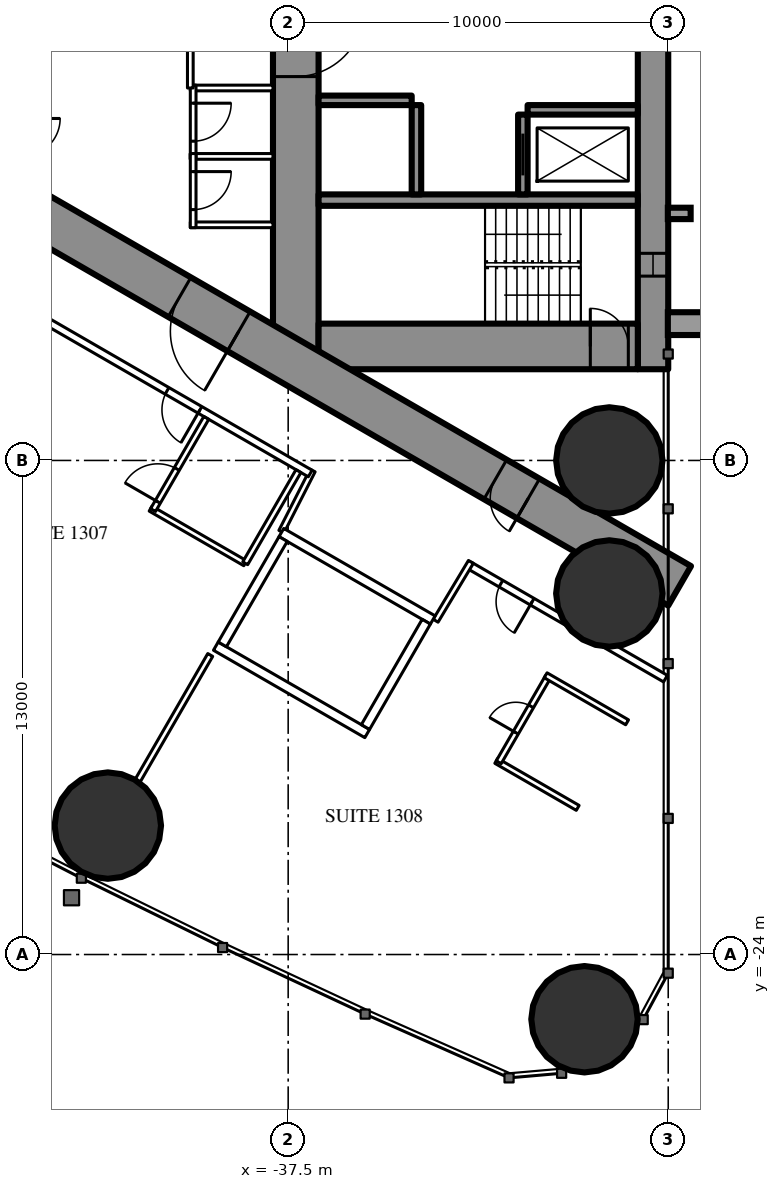
"""IFC4 building model, lengths in metres.
Left out: names, types, materials, properties, quantities, classifications, styles, units other than length and angle.
Written with IfcOpenShell. Run it as: python <this file> out.ifc"""

import sys

from ifc_helpers import new_model, si_unit, direction, frame, frame_2d, origin, origin_2d, place, context, subcontext, project, spatial, rectangle, hollow_circle, extrude, element, fill, save


model = new_model("IFC4")
c1 = context("Model", 3, precision=1e-05, world=origin(), true_north=direction((0.0, 1.0)))
c2 = subcontext(c1, "Body", "Model", "MODEL_VIEW")
j1 = project(units=[si_unit("LENGTHUNIT", "METRE"), si_unit("PLANEANGLEUNIT", "RADIAN")], contexts=[c1])
p1 = place(None, origin())
s1 = spatial("IfcSite", under=j1, at=p1, CompositionType="ELEMENT")
p2 = place(p1, origin())
s2 = spatial("IfcBuilding", under=s1, at=p2, CompositionType="ELEMENT")
p3 = place(p2, frame((0.0, 0.0, 53.0)))
s3 = spatial("IfcBuildingStorey", under=s2, at=p3, CompositionType="ELEMENT", Elevation=53.0)
for number, where, z_axis, x_axis in (
    (1, (-29.703, -25.703, 0.0), (0.0, 0.0, 1.0), (1.0, 0.0, 0.0)),
    (2, (-29.05, -11.0, 0.0), (0.0, 0.0, 1.0), (1.0, 0.0, 0.0)),
    (3, (-29.05, -14.5, 0.0), (0.0, 0.0, 1.0), (1.0, 0.0, 0.0)),
    (4, (-42.245, -20.607, 0.0), (0.0, 0.0, 1.0), (1.0, 0.0, 0.0)),
):
    element("IfcColumn", number, at=place(p3, frame(where, z_axis=z_axis, x_axis=x_axis)), inside=s3, PredefinedType="COLUMN", context=c2, shape_type="SweptSolid", body=[
        extrude(hollow_circle(Radius=1.4, WallThickness=0.12, at=origin_2d()), origin(), (0.0, 0.0, 1.0), 3.5),
    ])
p4 = place(p3, frame((-27.9, 8.6, 0.0), z_axis=(0.0, 0.0, 1.0), x_axis=(0.0, -1.0, 0.0)))
e5 = element("IfcWall", 5, at=p4, inside=s3, PredefinedType="SHEAR", context=c2, shape_type="SweptSolid", body=[
    extrude(rectangle(XDim=17.2, YDim=0.8, at=frame_2d((8.6, 0.0))), origin(), (0.0, 0.0, 1.0), 3.5),
])
p5 = place(p4, frame((2.45, 0.0, 0.6)))
e6 = element("IfcOpeningElement", 6, at=p5, cuts=e5, PredefinedType="OPENING", context=c2, shape_type="SweptSolid", body=[
    extrude(rectangle(XDim=0.6, YDim=2.1, at=frame_2d((0.3, 1.05))), frame((0.0, 0.41, 0.0), z_axis=(0.0, -1.0, 0.0), x_axis=(1.0, 0.0, 0.0)), (0.0, 0.0, 1.0), 0.82),
])
p6 = place(p4, frame((14.15, 0.0, 0.6)))
e7 = element("IfcOpeningElement", 7, at=p6, cuts=e5, PredefinedType="OPENING", context=c2, shape_type="SweptSolid", body=[
    extrude(rectangle(XDim=0.6, YDim=2.1, at=frame_2d((0.3, 1.05))), frame((0.0, 0.41, 0.0), z_axis=(0.0, -1.0, 0.0), x_axis=(1.0, 0.0, 0.0)), (0.0, 0.0, 1.0), 0.82),
])
p7 = place(p3, frame((-37.3, 8.6, 0.0), z_axis=(0.0, 0.0, 1.0), x_axis=(0.0, -1.0, 0.0)))
e8 = element("IfcWall", 8, at=p7, inside=s3, PredefinedType="SHEAR", context=c2, shape_type="SweptSolid", body=[
    extrude(rectangle(XDim=17.2, YDim=1.2, at=frame_2d((8.6, 0.0))), origin(), (0.0, 0.0, 1.0), 3.5),
])
p8 = place(p7, frame((7.7, 0.0, 0.0)))
e9 = element("IfcOpeningElement", 9, at=p8, cuts=e8, PredefinedType="OPENING", context=c2, shape_type="SweptSolid", body=[
    extrude(rectangle(XDim=1.8, YDim=2.2, at=frame_2d((0.9, 1.1))), frame((0.0, 0.61, 0.0), z_axis=(0.0, -1.0, 0.0), x_axis=(1.0, 0.0, 0.0)), (0.0, 0.0, 1.0), 1.22),
])
p9 = place(p3, frame((-28.3, -8.0, 0.0), z_axis=(0.0, 0.0, 1.0), x_axis=(-1.0, 0.0, 0.0)))
e10 = element("IfcWall", 10, at=p9, inside=s3, PredefinedType="SHEAR", context=c2, shape_type="SweptSolid", body=[
    extrude(rectangle(XDim=8.4, YDim=1.2, at=frame_2d((4.2, 0.0))), origin(), (0.0, 0.0, 1.0), 3.5),
])
p10 = place(p9, frame((0.25, 0.0, 0.0)))
e11 = element("IfcOpeningElement", 11, at=p10, cuts=e10, PredefinedType="OPENING", context=c2, shape_type="SweptSolid", body=[
    extrude(rectangle(XDim=1.0, YDim=2.2, at=frame_2d((0.5, 1.1))), frame((0.0, 0.61, 0.0), z_axis=(0.0, -1.0, 0.0), x_axis=(1.0, 0.0, 0.0)), (0.0, 0.0, 1.0), 1.22),
])
p11 = place(p3, frame((-28.3, -4.15, 0.0), z_axis=(0.0, 0.0, 1.0), x_axis=(-1.0, 0.0, 0.0)))
e12 = element("IfcWall", 12, at=p11, inside=s3, PredefinedType="SHEAR", context=c2, shape_type="SweptSolid", body=[
    extrude(rectangle(XDim=8.4, YDim=0.3, at=frame_2d((4.2, 0.0))), origin(), (0.0, 0.0, 1.0), 3.5),
])
p12 = place(p3, frame((-31.325, -1.9, 0.0), z_axis=(0.0, 0.0, 1.0), x_axis=(0.0, -1.0, 0.0)))
e13 = element("IfcWall", 13, at=p12, inside=s3, PredefinedType="SHEAR", context=c2, shape_type="SweptSolid", body=[
    extrude(rectangle(XDim=2.1, YDim=0.25, at=frame_2d((1.05, 0.0))), origin(), (0.0, 0.0, 1.0), 3.5),
])
p13 = place(p12, frame((0.5, 0.0, 0.0)))
e14 = element("IfcOpeningElement", 14, at=p13, cuts=e13, PredefinedType="OPENING", context=c2, shape_type="SweptSolid", body=[
    extrude(rectangle(XDim=1.1, YDim=2.2, at=frame_2d((0.55, 1.1))), frame((0.0, 0.135, 0.0), z_axis=(0.0, -1.0, 0.0), x_axis=(1.0, 0.0, 0.0)), (0.0, 0.0, 1.0), 0.27),
])
p14 = place(p3, frame((-34.125, -1.65, 0.0), z_axis=(0.0, 0.0, 1.0), x_axis=(0.0, -1.0, 0.0)))
e15 = element("IfcWall", 15, at=p14, inside=s3, PredefinedType="SHEAR", context=c2, shape_type="SweptSolid", body=[
    extrude(rectangle(XDim=2.35, YDim=0.25, at=frame_2d((1.175, 0.0))), origin(), (0.0, 0.0, 1.0), 3.5),
])
p15 = place(p3, frame((-28.3, -1.775, 0.0), z_axis=(0.0, 0.0, 1.0), x_axis=(-1.0, 0.0, 0.0)))
e16 = element("IfcWall", 16, at=p15, inside=s3, PredefinedType="SHEAR", context=c2, shape_type="SweptSolid", body=[
    extrude(rectangle(XDim=2.9, YDim=0.25, at=frame_2d((1.45, 0.0))), origin(), (0.0, 0.0, 1.0), 3.5),
])
p16 = place(p3, frame((-34.25, -1.525, 0.0), z_axis=(0.0, 0.0, 1.0), x_axis=(-1.0, 0.0, 0.0)))
e17 = element("IfcWall", 17, at=p16, inside=s3, PredefinedType="SHEAR", context=c2, shape_type="SweptSolid", body=[
    extrude(rectangle(XDim=2.45, YDim=0.25, at=frame_2d((1.225, 0.0))), origin(), (0.0, 0.0, 1.0), 3.5),
])
p17 = place(p3, frame((-27.2, 14.3, 0.0), z_axis=(0.0, 0.0, 1.0), x_axis=(-0.866026593062, -0.499997940104, 0.0)))
e18 = element("IfcWall", 18, at=p17, inside=s3, PredefinedType="SHEAR", context=c2, shape_type="SweptSolid", body=[
    extrude(rectangle(XDim=28.946, YDim=1.2, at=frame_2d((14.473, 0.0))), origin(), (0.0, 0.0, 1.0), 3.5),
])
p18 = place(p17, frame((4.6, 0.0, 0.0)))
e19 = element("IfcOpeningElement", 19, at=p18, cuts=e18, PredefinedType="OPENING", context=c2, shape_type="SweptSolid", body=[
    extrude(rectangle(XDim=1.0, YDim=2.2, at=frame_2d((0.5, 1.1))), frame((0.0, 0.61, 0.0), z_axis=(0.0, -1.0, 0.0), x_axis=(1.0, 0.0, 0.0)), (0.0, 0.0, 1.0), 1.22),
])
p19 = place(p17, frame((13.395, 0.0, 0.0)))
e20 = element("IfcOpeningElement", 20, at=p19, cuts=e18, PredefinedType="OPENING", context=c2, shape_type="SweptSolid", body=[
    extrude(rectangle(XDim=1.8, YDim=2.2, at=frame_2d((0.9, 1.1))), frame((0.0, 0.61, 0.0), z_axis=(0.0, -1.0, 0.0), x_axis=(1.0, 0.0, 0.0)), (0.0, 0.0, 1.0), 1.22),
])
p20 = place(p3, frame((-27.2, -14.3, 0.0), z_axis=(0.0, 0.0, 1.0), x_axis=(-0.866024021859, 0.500002393557, 0.0)))
e21 = element("IfcWall", 21, at=p20, inside=s3, PredefinedType="SHEAR", context=c2, shape_type="SweptSolid", body=[
    extrude(rectangle(XDim=27.907, YDim=1.2, at=frame_2d((13.954, 0.0))), origin(), (0.0, 0.0, 1.0), 3.5),
])
p21 = place(p20, frame((4.6, 0.0, 0.0)))
e22 = element("IfcOpeningElement", 22, at=p21, cuts=e21, PredefinedType="OPENING", context=c2, shape_type="SweptSolid", body=[
    extrude(rectangle(XDim=1.0, YDim=2.2, at=frame_2d((0.5, 1.1))), frame((0.0, 0.61, 0.0), z_axis=(0.0, -1.0, 0.0), x_axis=(1.0, 0.0, 0.0)), (0.0, 0.0, 1.0), 1.22),
])
p22 = place(p20, frame((13.395, 0.0, 0.0)))
e23 = element("IfcOpeningElement", 23, at=p22, cuts=e21, PredefinedType="OPENING", context=c2, shape_type="SweptSolid", body=[
    extrude(rectangle(XDim=1.8, YDim=2.2, at=frame_2d((0.9, 1.1))), frame((0.0, 0.61, 0.0), z_axis=(0.0, -1.0, 0.0), x_axis=(1.0, 0.0, 0.0)), (0.0, 0.0, 1.0), 1.22),
])
p23 = place(p3, frame((-39.551, -16.118, 0.0), z_axis=(0.0, 0.0, 1.0), x_axis=(-0.499986503906, -0.866033195618, 0.0)))
e24 = element("IfcWall", 24, at=p23, inside=s3, PredefinedType="PARTITIONING", context=c2, shape_type="SweptSolid", body=[
    extrude(rectangle(XDim=3.815, YDim=0.15, at=frame_2d((1.907, 0.0))), origin(), (0.0, 0.0, 1.0), 3.25),
])
p24 = place(p3, frame((-27.572, -16.741, 0.0), z_axis=(0.0, 0.0, 1.0), x_axis=(-0.866024464444, 0.500001626982, 0.0)))
e25 = element("IfcWall", 25, at=p24, inside=s3, PredefinedType="PARTITIONING", context=c2, shape_type="SweptSolid", body=[
    extrude(rectangle(XDim=5.955, YDim=0.2, at=frame_2d((2.978, 0.0))), origin(), (0.0, 0.0, 1.0), 3.25),
])
p25 = place(p24, frame((4.05, 0.0, 0.0)))
e26 = element("IfcOpeningElement", 26, at=p25, cuts=e25, PredefinedType="OPENING", context=c2, shape_type="SweptSolid", body=[
    extrude(rectangle(XDim=0.95, YDim=2.2, at=frame_2d((0.475, 1.1))), frame((0.0, 0.11, 0.0), z_axis=(0.0, -1.0, 0.0), x_axis=(1.0, 0.0, 0.0)), (0.0, 0.0, 1.0), 0.22),
])
p26 = place(p3, frame((-36.857, -11.265, 0.0), z_axis=(0.0, 0.0, 1.0), x_axis=(-0.454225294761, -0.890886851176, 0.0)))
e27 = element("IfcWall", 27, at=p26, inside=s3, PredefinedType="PARTITIONING", context=c2, shape_type="SweptSolid", body=[
    extrude(rectangle(XDim=1.807, YDim=0.15, at=frame_2d((0.904, 0.0))), origin(), (0.0, 0.0, 1.0), 3.25),
])
p27 = place(p3, frame((-33.621, -15.218, 0.0), z_axis=(0.0, 0.0, 1.0), x_axis=(0.514336634837, 0.857588377991, 0.0)))
e28 = element("IfcWall", 28, at=p27, inside=s3, PredefinedType="PARTITIONING", context=c2, shape_type="SweptSolid", body=[
    extrude(rectangle(XDim=1.805, YDim=0.15, at=frame_2d((0.903, 0.0))), origin(), (0.0, 0.0, 1.0), 3.25),
])
p28 = place(p3, frame((-36.92, -11.344, 0.0), z_axis=(0.0, 0.0, 1.0), x_axis=(-0.866025017052, 0.500000669839, 0.0)))
e29 = element("IfcWall", 29, at=p28, inside=s3, PredefinedType="PARTITIONING", context=c2, shape_type="SweptSolid", body=[
    extrude(rectangle(XDim=12.28, YDim=0.2, at=frame_2d((6.14, 0.0))), origin(), (0.0, 0.0, 1.0), 3.25),
])
p29 = place(p28, frame((3.35, 0.0, 0.0)))
e30 = element("IfcOpeningElement", 30, at=p29, cuts=e29, PredefinedType="OPENING", context=c2, shape_type="SweptSolid", body=[
    extrude(rectangle(XDim=1.0, YDim=2.2, at=frame_2d((0.5, 1.1))), frame((0.0, 0.11, 0.0), z_axis=(0.0, -1.0, 0.0), x_axis=(1.0, 0.0, 0.0)), (0.0, 0.0, 1.0), 0.22),
])
p30 = place(p3, frame((-38.63, -13.705, 0.0), z_axis=(0.0, 0.0, 1.0), x_axis=(-0.866018712932, 0.500011588718, 0.0)))
e31 = element("IfcWall", 31, at=p30, inside=s3, PredefinedType="PARTITIONING", context=c2, shape_type="SweptSolid", body=[
    extrude(rectangle(XDim=2.875, YDim=0.15, at=frame_2d((1.438, 0.0))), origin(), (0.0, 0.0, 1.0), 3.25),
])
p31 = place(p3, frame((-39.655, -9.88, 0.0), z_axis=(0.0, 0.0, 1.0), x_axis=(-0.500049511043, -0.865996816683, 0.0)))
e32 = element("IfcWall", 32, at=p31, inside=s3, PredefinedType="PARTITIONING", context=c2, shape_type="SweptSolid", body=[
    extrude(rectangle(XDim=2.8, YDim=0.15, at=frame_2d((1.4, 0.0))), origin(), (0.0, 0.0, 1.0), 3.25),
])
p32 = place(p31, frame((1.55, 0.0, 0.0)))
e33 = element("IfcOpeningElement", 33, at=p32, cuts=e32, PredefinedType="OPENING", context=c2, shape_type="SweptSolid", body=[
    extrude(rectangle(XDim=1.0, YDim=2.2, at=frame_2d((0.5, 1.1))), frame((0.0, 0.085, 0.0), z_axis=(0.0, -1.0, 0.0), x_axis=(1.0, 0.0, 0.0)), (0.0, 0.0, 1.0), 0.17),
])
p33 = place(p3, frame((-37.23, -11.281, 0.0), z_axis=(0.0, 0.0, 1.0), x_axis=(-0.500049511043, -0.865996816683, 0.0)))
e34 = element("IfcWall", 34, at=p33, inside=s3, PredefinedType="PARTITIONING", context=c2, shape_type="SweptSolid", body=[
    extrude(rectangle(XDim=2.8, YDim=0.15, at=frame_2d((1.4, 0.0))), origin(), (0.0, 0.0, 1.0), 3.25),
])
p34 = place(p3, frame((-29.882, -20.142, 0.0), z_axis=(0.0, 0.0, 1.0), x_axis=(-0.866031185235, 0.4999899861, 0.0)))
e35 = element("IfcWall", 35, at=p34, inside=s3, PredefinedType="PARTITIONING", context=c2, shape_type="SweptSolid", body=[
    extrude(rectangle(XDim=2.475, YDim=0.15, at=frame_2d((1.238, 0.0))), origin(), (0.0, 0.0, 1.0), 3.25),
])
p35 = place(p3, frame((-30.66, -16.69, 0.0), z_axis=(0.0, 0.0, 1.0), x_axis=(-0.499936506574, -0.866062058628, 0.0)))
e36 = element("IfcWall", 36, at=p35, inside=s3, PredefinedType="PARTITIONING", context=c2, shape_type="SweptSolid", body=[
    extrude(rectangle(XDim=2.6, YDim=0.15, at=frame_2d((1.3, 0.0))), origin(), (0.0, 0.0, 1.0), 3.25),
])
p36 = place(p35, frame((0.9, 0.0, 0.0)))
e37 = element("IfcOpeningElement", 37, at=p36, cuts=e36, PredefinedType="OPENING", context=c2, shape_type="SweptSolid", body=[
    extrude(rectangle(XDim=0.8, YDim=2.2, at=frame_2d((0.4, 1.1))), frame((0.0, 0.085, 0.0), z_axis=(0.0, -1.0, 0.0), x_axis=(1.0, 0.0, 0.0)), (0.0, 0.0, 1.0), 0.17),
])
p37 = place(p3, frame((-28.582, -17.89, 0.0), z_axis=(0.0, 0.0, 1.0), x_axis=(-0.866073894602, 0.499916002032, 0.0)))
e38 = element("IfcWall", 38, at=p37, inside=s3, PredefinedType="PARTITIONING", context=c2, shape_type="SweptSolid", body=[
    extrude(rectangle(XDim=2.475, YDim=0.15, at=frame_2d((1.238, 0.0))), origin(), (0.0, 0.0, 1.0), 3.25),
])
for number, where, z_axis, x_axis in (
    (39, (-37.9, -1.2, 0.0), (0.0, 0.0, 1.0), (-1.0, 0.0, 0.0)),
    (40, (-37.9, -3.0, 0.0), (0.0, 0.0, 1.0), (-1.0, 0.0, 0.0)),
    (41, (-37.9, -4.8, 0.0), (0.0, 0.0, 1.0), (-1.0, 0.0, 0.0)),
):
    element("IfcWall", number, at=place(p3, frame(where, z_axis=z_axis, x_axis=x_axis)), inside=s3, PredefinedType="PARTITIONING", context=c2, shape_type="SweptSolid", body=[
        extrude(rectangle(XDim=2.175, YDim=0.15, at=frame_2d((1.087, 0.0))), origin(), (0.0, 0.0, 1.0), 3.25),
    ])
p38 = place(p3, frame((-40.0, -1.125, 0.0), z_axis=(0.0, 0.0, 1.0), x_axis=(0.0, -1.0, 0.0)))
e42 = element("IfcWall", 42, at=p38, inside=s3, PredefinedType="PARTITIONING", context=c2, shape_type="SweptSolid", body=[
    extrude(rectangle(XDim=1.95, YDim=0.15, at=frame_2d((0.975, 0.0))), origin(), (0.0, 0.0, 1.0), 3.25),
])
p39 = place(p38, frame((0.475, 0.0, 0.0)))
e43 = element("IfcOpeningElement", 43, at=p39, cuts=e42, PredefinedType="OPENING", context=c2, shape_type="SweptSolid", body=[
    extrude(rectangle(XDim=1.0, YDim=2.2, at=frame_2d((0.5, 1.1))), frame((0.0, 0.085, 0.0), z_axis=(0.0, -1.0, 0.0), x_axis=(1.0, 0.0, 0.0)), (0.0, 0.0, 1.0), 0.17),
])
p40 = place(p3, frame((-40.0, -2.925, 0.0), z_axis=(0.0, 0.0, 1.0), x_axis=(0.0, -1.0, 0.0)))
e44 = element("IfcWall", 44, at=p40, inside=s3, PredefinedType="PARTITIONING", context=c2, shape_type="SweptSolid", body=[
    extrude(rectangle(XDim=1.95, YDim=0.15, at=frame_2d((0.975, 0.0))), origin(), (0.0, 0.0, 1.0), 3.25),
])
p41 = place(p40, frame((0.475, 0.0, 0.0)))
e45 = element("IfcOpeningElement", 45, at=p41, cuts=e44, PredefinedType="OPENING", context=c2, shape_type="SweptSolid", body=[
    extrude(rectangle(XDim=1.0, YDim=2.2, at=frame_2d((0.5, 1.1))), frame((0.0, 0.085, 0.0), z_axis=(0.0, -1.0, 0.0), x_axis=(1.0, 0.0, 0.0)), (0.0, 0.0, 1.0), 0.17),
])
p42 = place(p3, frame((-40.075, 6.174, 0.0), z_axis=(0.0, 0.0, 1.0), x_axis=(0.0, -1.0, 0.0)))
e46 = element("IfcWall", 46, at=p42, inside=s3, PredefinedType="PARTITIONING", context=c2, shape_type="SweptSolid", body=[
    extrude(rectangle(XDim=7.374, YDim=0.15, at=frame_2d((3.687, 0.0))), origin(), (0.0, 0.0, 1.0), 3.25),
])
p43 = place(p42, frame((2.787, 0.0, 0.0)))
e47 = element("IfcOpeningElement", 47, at=p43, cuts=e46, PredefinedType="OPENING", context=c2, shape_type="SweptSolid", body=[
    extrude(rectangle(XDim=1.8, YDim=2.2, at=frame_2d((0.9, 1.1))), frame((0.0, 0.085, 0.0), z_axis=(0.0, -1.0, 0.0), x_axis=(1.0, 0.0, 0.0)), (0.0, 0.0, 1.0), 0.17),
])
p44 = place(p3, frame((-33.696, -15.197, 0.0), z_axis=(0.0, 0.0, 1.0), x_axis=(-0.865976953817, 0.500083908417, 0.0)))
e48 = element("IfcWall", 48, at=p44, inside=s3, PredefinedType="PARTITIONING", context=c2, shape_type="SweptSolid", body=[
    extrude(rectangle(XDim=4.599, YDim=0.25, at=frame_2d((2.3, 0.0))), origin(), (0.0, 0.0, 1.0), 3.25),
])
p45 = place(p3, frame((-35.42, -18.186, 0.0), z_axis=(0.0, 0.0, 1.0), x_axis=(-0.865990227814, 0.50006092162, 0.0)))
e49 = element("IfcWall", 49, at=p45, inside=s3, PredefinedType="PARTITIONING", context=c2, shape_type="SweptSolid", body=[
    extrude(rectangle(XDim=4.6, YDim=0.25, at=frame_2d((2.3, 0.0))), origin(), (0.0, 0.0, 1.0), 3.25),
])
p46 = place(p3, frame((-33.866, -15.243, 0.0), z_axis=(0.0, 0.0, 1.0), x_axis=(-0.499929347863, -0.866066190972, 0.0)))
e50 = element("IfcWall", 50, at=p46, inside=s3, PredefinedType="PARTITIONING", context=c2, shape_type="SweptSolid", body=[
    extrude(rectangle(XDim=3.201, YDim=0.25, at=frame_2d((1.6, 0.0))), origin(), (0.0, 0.0, 1.0), 3.25),
])
p47 = place(p3, frame((-37.633, -13.068, 0.0), z_axis=(0.0, 0.0, 1.0), x_axis=(-0.499872130319, -0.866099216793, 0.0)))
e51 = element("IfcWall", 51, at=p47, inside=s3, PredefinedType="PARTITIONING", context=c2, shape_type="SweptSolid", body=[
    extrude(rectangle(XDim=3.2, YDim=0.25, at=frame_2d((1.6, 0.0))), origin(), (0.0, 0.0, 1.0), 3.25),
])
p48 = place(p32, origin())
e52 = element("IfcDoor", 52, at=p48, inside=s3, OperationType="SINGLE_SWING_RIGHT", PredefinedType="DOOR", context=c2, shape_type="SweptSolid", body=[
    extrude(rectangle(XDim=1.0, YDim=2.2, at=frame_2d((0.5, 1.1))), frame((0.0, 0.025, 0.0), z_axis=(0.0, -1.0, 0.0), x_axis=(1.0, 0.0, 0.0)), (0.0, 0.0, 1.0), 0.05),
])
fill(e33, e52)
p49 = place(p29, origin())
e53 = element("IfcDoor", 53, at=p49, inside=s3, OperationType="SINGLE_SWING_LEFT", PredefinedType="DOOR", context=c2, shape_type="SweptSolid", body=[
    extrude(rectangle(XDim=1.0, YDim=2.2, at=frame_2d((0.5, 1.1))), frame((0.0, 0.025, 0.0), z_axis=(0.0, -1.0, 0.0), x_axis=(1.0, 0.0, 0.0)), (0.0, 0.0, 1.0), 0.05),
])
fill(e30, e53)
p50 = place(p36, origin())
e54 = element("IfcDoor", 54, at=p50, inside=s3, OperationType="SINGLE_SWING_RIGHT", PredefinedType="DOOR", context=c2, shape_type="SweptSolid", body=[
    extrude(rectangle(XDim=0.8, YDim=2.2, at=frame_2d((0.4, 1.1))), frame((0.0, 0.025, 0.0), z_axis=(0.0, -1.0, 0.0), x_axis=(1.0, 0.0, 0.0)), (0.0, 0.0, 1.0), 0.05),
])
fill(e37, e54)
p51 = place(p25, origin())
e55 = element("IfcDoor", 55, at=p51, inside=s3, OperationType="SINGLE_SWING_LEFT", PredefinedType="DOOR", context=c2, shape_type="SweptSolid", body=[
    extrude(rectangle(XDim=0.95, YDim=2.2, at=frame_2d((0.475, 1.1))), frame((0.0, 0.025, 0.0), z_axis=(0.0, -1.0, 0.0), x_axis=(1.0, 0.0, 0.0)), (0.0, 0.0, 1.0), 0.05),
])
fill(e26, e55)
p52 = place(p39, origin())
e56 = element("IfcDoor", 56, at=p52, inside=s3, OperationType="SINGLE_SWING_LEFT", PredefinedType="DOOR", context=c2, shape_type="SweptSolid", body=[
    extrude(rectangle(XDim=1.0, YDim=2.2, at=frame_2d((0.5, 1.1))), frame((0.0, 0.025, 0.0), z_axis=(0.0, -1.0, 0.0), x_axis=(1.0, 0.0, 0.0)), (0.0, 0.0, 1.0), 0.05),
])
fill(e43, e56)
p53 = place(p41, origin())
e57 = element("IfcDoor", 57, at=p53, inside=s3, OperationType="SINGLE_SWING_LEFT", PredefinedType="DOOR", context=c2, shape_type="SweptSolid", body=[
    extrude(rectangle(XDim=1.0, YDim=2.2, at=frame_2d((0.5, 1.1))), frame((0.0, 0.025, 0.0), z_axis=(0.0, -1.0, 0.0), x_axis=(1.0, 0.0, 0.0)), (0.0, 0.0, 1.0), 0.05),
])
fill(e45, e57)
p54 = place(p21, origin())
e58 = element("IfcDoor", 58, at=p54, inside=s3, OperationType="SINGLE_SWING_LEFT", PredefinedType="DOOR", context=c2, shape_type="SweptSolid", body=[
    extrude(rectangle(XDim=1.0, YDim=2.2, at=frame_2d((0.5, 1.1))), frame((0.0, 0.025, 0.0), z_axis=(0.0, -1.0, 0.0), x_axis=(1.0, 0.0, 0.0)), (0.0, 0.0, 1.0), 0.05),
])
fill(e22, e58)
p55 = place(p22, origin())
e59 = element("IfcDoor", 59, at=p55, inside=s3, OperationType="DOUBLE_DOOR_SINGLE_SWING", PredefinedType="DOOR", context=c2, shape_type="SweptSolid", body=[
    extrude(rectangle(XDim=1.8, YDim=2.2, at=frame_2d((0.9, 1.1))), frame((0.0, 0.025, 0.0), z_axis=(0.0, -1.0, 0.0), x_axis=(1.0, 0.0, 0.0)), (0.0, 0.0, 1.0), 0.05),
])
fill(e23, e59)
p56 = place(p8, origin())
e60 = element("IfcDoor", 60, at=p56, inside=s3, OperationType="DOUBLE_DOOR_SINGLE_SWING", PredefinedType="DOOR", context=c2, shape_type="SweptSolid", body=[
    extrude(rectangle(XDim=1.8, YDim=2.2, at=frame_2d((0.9, 1.1))), frame((0.0, 0.025, 0.0), z_axis=(0.0, -1.0, 0.0), x_axis=(1.0, 0.0, 0.0)), (0.0, 0.0, 1.0), 0.05),
])
fill(e9, e60)
p57 = place(p10, origin())
e61 = element("IfcDoor", 61, at=p57, inside=s3, OperationType="SINGLE_SWING_RIGHT", PredefinedType="DOOR", context=c2, shape_type="SweptSolid", body=[
    extrude(rectangle(XDim=1.0, YDim=2.2, at=frame_2d((0.5, 1.1))), frame((0.0, 0.025, 0.0), z_axis=(0.0, -1.0, 0.0), x_axis=(1.0, 0.0, 0.0)), (0.0, 0.0, 1.0), 0.05),
])
fill(e11, e61)
p58 = place(p13, origin())
e62 = element("IfcDoor", 62, at=p58, inside=s3, OperationType="SLIDING_TO_LEFT", PredefinedType="USERDEFINED", context=c2, shape_type="SweptSolid", body=[
    extrude(rectangle(XDim=1.1, YDim=2.2, at=frame_2d((0.55, 1.1))), frame((0.0, 0.025, 0.0), z_axis=(0.0, -1.0, 0.0), x_axis=(1.0, 0.0, 0.0)), (0.0, 0.0, 1.0), 0.05),
])
fill(e14, e62)
p59 = place(p6, origin())
e63 = element("IfcWindow", 63, at=p59, inside=s3, PartitioningType="SINGLE_PANEL", PredefinedType="WINDOW", context=c2, shape_type="SweptSolid", body=[
    extrude(rectangle(XDim=0.6, YDim=2.1, at=frame_2d((0.3, 1.05))), frame((0.0, 0.03, 0.0), z_axis=(0.0, -1.0, 0.0), x_axis=(1.0, 0.0, 0.0)), (0.0, 0.0, 1.0), 0.06),
])
fill(e7, e63)
save(model, sys.argv[1])
